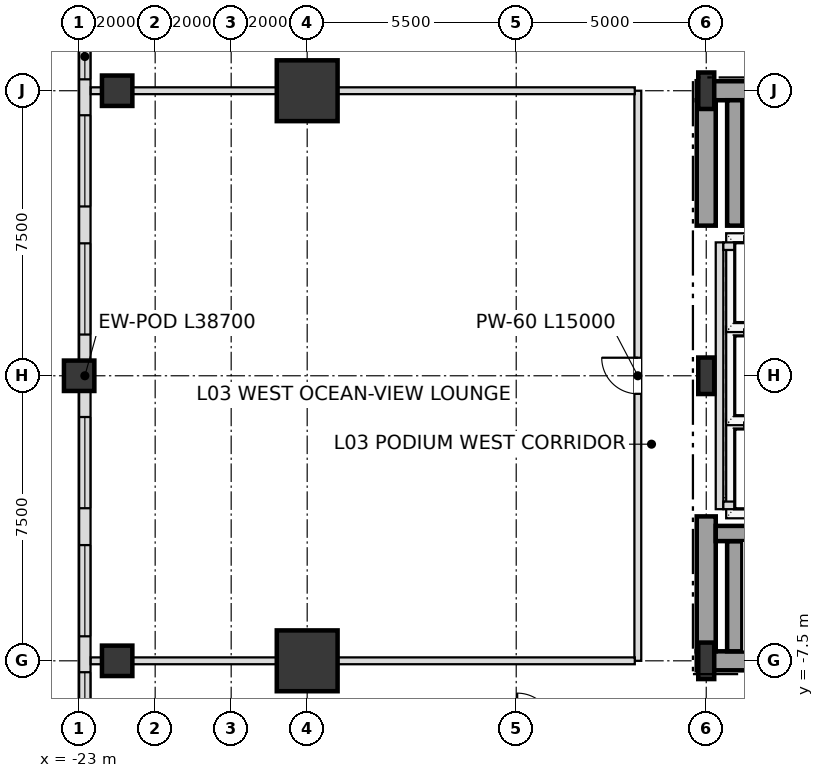
"""IFC4 building model, lengths in metres.
Left out: names, types, materials, properties, quantities, classifications, styles, units other than length and angle.
Written with IfcOpenShell. Run it as: python <this file> out.ifc"""

import sys

from ifc_helpers import new_model, si_unit, direction, frame, frame_2d, origin, origin_2d, place, context, subcontext, project, spatial, rectangle, i_section, extrude, element, fill, save


model = new_model("IFC4")
c1 = context("Model", 3, precision=1e-05, world=origin(), true_north=direction((0.0, 1.0)))
c2 = subcontext(c1, "Body", "Model", "MODEL_VIEW")
j1 = project(units=[si_unit("LENGTHUNIT", "METRE"), si_unit("PLANEANGLEUNIT", "RADIAN")], contexts=[c1])
p1 = place(None, origin())
s1 = spatial("IfcSite", under=j1, at=p1, CompositionType="ELEMENT")
p2 = place(p1, origin())
s2 = spatial("IfcBuilding", under=s1, at=p2, CompositionType="ELEMENT")
p3 = place(p2, frame((0.0, 0.0, 16.8)))
s3 = spatial("IfcBuildingStorey", under=s2, at=p3, CompositionType="ELEMENT", Elevation=16.8)
for number, where, z_axis, x_axis in (
    (1, (-6.5, -7.5, 0.0), (0.0, 0.0, 1.0), (1.0, 0.0, 0.0)),
    (2, (-6.5, 0.0, 0.0), (0.0, 0.0, 1.0), (1.0, 0.0, 0.0)),
    (3, (-6.5, 7.5, 0.0), (0.0, 0.0, 1.0), (1.0, 0.0, 0.0)),
):
    element("IfcColumn", number, at=place(p3, frame(where, z_axis=z_axis, x_axis=x_axis)), inside=s3, PredefinedType="COLUMN", context=c2, shape_type="SweptSolid", body=[
        extrude(i_section(OverallWidth=0.42, OverallDepth=0.96, WebThickness=0.022, FlangeThickness=0.034, at=origin_2d()), origin(), (0.0, 0.0, 1.0), 5.4),
    ])
for number, where, z_axis, x_axis in (
    (4, (-17.0, 7.5, 0.0), (0.0, 0.0, 1.0), (1.0, 0.0, 0.0)),
    (5, (-17.0, -7.5, 0.0), (0.0, 0.0, 1.0), (1.0, 0.0, 0.0)),
):
    element("IfcColumn", number, at=place(p3, frame(where, z_axis=z_axis, x_axis=x_axis)), inside=s3, PredefinedType="USERDEFINED", context=c2, shape_type="SweptSolid", body=[
        extrude(rectangle(XDim=1.6, YDim=1.6, at=origin_2d()), origin(), (0.0, 0.0, 1.0), 5.4),
    ])
for number, where, z_axis, x_axis in (
    (6, (-23.0, 0.0, 0.0), (0.0, 0.0, 1.0), (1.0, 0.0, 0.0)),
    (7, (-22.0, -7.5, 0.0), (0.0, 0.0, 1.0), (1.0, 0.0, 0.0)),
    (8, (-22.0, 7.5, 0.0), (0.0, 0.0, 1.0), (1.0, 0.0, 0.0)),
):
    element("IfcColumn", number, at=place(p3, frame(where, z_axis=z_axis, x_axis=x_axis)), inside=s3, PredefinedType="COLUMN", context=c2, shape_type="SweptSolid", body=[
        extrude(rectangle(XDim=0.8, YDim=0.8, at=origin_2d()), origin(), (0.0, 0.0, 1.0), 5.4),
    ])
p4 = place(p3, frame((-22.85, 19.35, 0.0), z_axis=(0.0, 0.0, 1.0), x_axis=(0.0, -1.0, 0.0)))
e9 = element("IfcWall", 9, at=p4, inside=s3, PredefinedType="SOLIDWALL", context=c2, shape_type="SweptSolid", body=[
    extrude(rectangle(XDim=38.7, YDim=0.3, at=frame_2d((19.35, 0.0))), origin(), (0.0, 0.0, 1.0), 4.476),
])
p5 = place(p4, frame((1.83, 0.0, 0.8)))
e10 = element("IfcOpeningElement", 10, at=p5, cuts=e9, PredefinedType="OPENING", context=c2, shape_type="SweptSolid", body=[
    extrude(rectangle(XDim=2.4, YDim=2.2, at=frame_2d((1.2, 1.1))), frame((0.0, 0.16, 0.0), z_axis=(0.0, -1.0, 0.0), x_axis=(1.0, 0.0, 0.0)), (0.0, 0.0, 1.0), 0.32),
])
p6 = place(p4, frame((7.22, 0.0, 0.8)))
e11 = element("IfcOpeningElement", 11, at=p6, cuts=e9, PredefinedType="OPENING", context=c2, shape_type="SweptSolid", body=[
    extrude(rectangle(XDim=2.4, YDim=2.2, at=frame_2d((1.2, 1.1))), frame((0.0, 0.16, 0.0), z_axis=(0.0, -1.0, 0.0), x_axis=(1.0, 0.0, 0.0)), (0.0, 0.0, 1.0), 0.32),
])
p7 = place(p4, frame((10.35, 0.0, 0.72)))
e12 = element("IfcOpeningElement", 12, at=p7, cuts=e9, PredefinedType="OPENING", context=c2, shape_type="SweptSolid", body=[
    extrude(rectangle(XDim=1.2, YDim=1.68, at=frame_2d((0.6, 0.84))), frame((0.0, 0.16, 0.0), z_axis=(0.0, -1.0, 0.0), x_axis=(1.0, 0.0, 0.0)), (0.0, 0.0, 1.0), 0.32),
])
p8 = place(p4, frame((12.495, 0.0, 0.8)))
e13 = element("IfcOpeningElement", 13, at=p8, cuts=e9, PredefinedType="OPENING", context=c2, shape_type="SweptSolid", body=[
    extrude(rectangle(XDim=2.4, YDim=2.2, at=frame_2d((1.2, 1.1))), frame((0.0, 0.16, 0.0), z_axis=(0.0, -1.0, 0.0), x_axis=(1.0, 0.0, 0.0)), (0.0, 0.0, 1.0), 0.32),
])
p9 = place(p4, frame((15.865, 0.0, 0.8)))
e14 = element("IfcOpeningElement", 14, at=p9, cuts=e9, PredefinedType="OPENING", context=c2, shape_type="SweptSolid", body=[
    extrude(rectangle(XDim=2.4, YDim=2.2, at=frame_2d((1.2, 1.1))), frame((0.0, 0.16, 0.0), z_axis=(0.0, -1.0, 0.0), x_axis=(1.0, 0.0, 0.0)), (0.0, 0.0, 1.0), 0.32),
])
p10 = place(p4, frame((20.435, 0.0, 0.8)))
e15 = element("IfcOpeningElement", 15, at=p10, cuts=e9, PredefinedType="OPENING", context=c2, shape_type="SweptSolid", body=[
    extrude(rectangle(XDim=2.4, YDim=2.2, at=frame_2d((1.2, 1.1))), frame((0.0, 0.16, 0.0), z_axis=(0.0, -1.0, 0.0), x_axis=(1.0, 0.0, 0.0)), (0.0, 0.0, 1.0), 0.32),
])
p11 = place(p4, frame((23.805, 0.0, 0.8)))
e16 = element("IfcOpeningElement", 16, at=p11, cuts=e9, PredefinedType="OPENING", context=c2, shape_type="SweptSolid", body=[
    extrude(rectangle(XDim=2.4, YDim=2.2, at=frame_2d((1.2, 1.1))), frame((0.0, 0.16, 0.0), z_axis=(0.0, -1.0, 0.0), x_axis=(1.0, 0.0, 0.0)), (0.0, 0.0, 1.0), 0.32),
])
p12 = place(p4, frame((27.15, 0.0, 0.72)))
e17 = element("IfcOpeningElement", 17, at=p12, cuts=e9, PredefinedType="OPENING", context=c2, shape_type="SweptSolid", body=[
    extrude(rectangle(XDim=1.2, YDim=1.68, at=frame_2d((0.6, 0.84))), frame((0.0, 0.16, 0.0), z_axis=(0.0, -1.0, 0.0), x_axis=(1.0, 0.0, 0.0)), (0.0, 0.0, 1.0), 0.32),
])
p13 = place(p4, frame((29.08, 0.0, 0.8)))
e18 = element("IfcOpeningElement", 18, at=p13, cuts=e9, PredefinedType="OPENING", context=c2, shape_type="SweptSolid", body=[
    extrude(rectangle(XDim=2.4, YDim=2.2, at=frame_2d((1.2, 1.1))), frame((0.0, 0.16, 0.0), z_axis=(0.0, -1.0, 0.0), x_axis=(1.0, 0.0, 0.0)), (0.0, 0.0, 1.0), 0.32),
])
p14 = place(p4, frame((34.47, 0.0, 0.8)))
e19 = element("IfcOpeningElement", 19, at=p14, cuts=e9, PredefinedType="OPENING", context=c2, shape_type="SweptSolid", body=[
    extrude(rectangle(XDim=2.4, YDim=2.2, at=frame_2d((1.2, 1.1))), frame((0.0, 0.16, 0.0), z_axis=(0.0, -1.0, 0.0), x_axis=(1.0, 0.0, 0.0)), (0.0, 0.0, 1.0), 0.32),
])
p15 = place(p3, frame((-6.75, -7.5, 0.0), z_axis=(0.0, 0.0, 1.0), x_axis=(1.0, 0.0, 0.0)))
e20 = element("IfcWall", 20, at=p15, inside=s3, PredefinedType="SHEAR", context=c2, shape_type="SweptSolid", body=[
    extrude(rectangle(XDim=6.75, YDim=0.5, at=frame_2d((3.375, 0.0))), origin(), (0.0, 0.0, 1.0), 5.12),
])
p16 = place(p3, frame((-6.75, 7.5, 0.0), z_axis=(0.0, 0.0, 1.0), x_axis=(1.0, 0.0, 0.0)))
e21 = element("IfcWall", 21, at=p16, inside=s3, PredefinedType="SHEAR", context=c2, shape_type="SweptSolid", body=[
    extrude(rectangle(XDim=6.75, YDim=0.5, at=frame_2d((3.375, 0.0))), origin(), (0.0, 0.0, 1.0), 5.12),
])
p17 = place(p16, frame((1.65, 0.0, 0.0)))
e22 = element("IfcOpeningElement", 22, at=p17, cuts=e21, PredefinedType="OPENING", context=c2, shape_type="SweptSolid", body=[
    extrude(rectangle(XDim=1.05, YDim=2.15, at=frame_2d((0.525, 1.075))), frame((0.0, 0.26, 0.0), z_axis=(0.0, -1.0, 0.0), x_axis=(1.0, 0.0, 0.0)), (0.0, 0.0, 1.0), 0.52),
])
p18 = place(p3, frame((-6.5, -7.25, 0.0), z_axis=(0.0, 0.0, 1.0), x_axis=(0.0, 1.0, 0.0)))
e23 = element("IfcWall", 23, at=p18, inside=s3, PredefinedType="SHEAR", context=c2, shape_type="SweptSolid", body=[
    extrude(rectangle(XDim=3.55, YDim=0.5, at=frame_2d((1.775, 0.0))), origin(), (0.0, 0.0, 1.0), 5.12),
])
p19 = place(p3, frame((-6.5, 3.95, 0.0), z_axis=(0.0, 0.0, 1.0), x_axis=(0.0, 1.0, 0.0)))
e24 = element("IfcWall", 24, at=p19, inside=s3, PredefinedType="SHEAR", context=c2, shape_type="SweptSolid", body=[
    extrude(rectangle(XDim=3.3, YDim=0.5, at=frame_2d((1.65, 0.0))), origin(), (0.0, 0.0, 1.0), 5.12),
])
p20 = place(p3, frame((-5.75, -7.25, 0.0), z_axis=(0.0, 0.0, 1.0), x_axis=(0.0, 1.0, 0.0)))
e25 = element("IfcWall", 25, at=p20, inside=s3, PredefinedType="SHEAR", context=c2, shape_type="SweptSolid", body=[
    extrude(rectangle(XDim=2.9, YDim=0.4, at=frame_2d((1.45, 0.0))), origin(), (0.0, 0.0, 1.0), 5.12),
])
p21 = place(p3, frame((-6.25, -4.15, 0.0), z_axis=(0.0, 0.0, 1.0), x_axis=(1.0, 0.0, 0.0)))
e26 = element("IfcWall", 26, at=p21, inside=s3, PredefinedType="SHEAR", context=c2, shape_type="SweptSolid", body=[
    extrude(rectangle(XDim=7.78, YDim=0.4, at=frame_2d((3.89, 0.0))), origin(), (0.0, 0.0, 1.0), 5.12),
])
p22 = place(p3, frame((-5.55, 4.15, 0.0), z_axis=(0.0, 0.0, 1.0), x_axis=(1.0, 0.0, 0.0)))
e27 = element("IfcWall", 27, at=p22, inside=s3, PredefinedType="SHEAR", context=c2, shape_type="SweptSolid", body=[
    extrude(rectangle(XDim=7.08, YDim=0.4, at=frame_2d((3.54, 0.0))), origin(), (0.0, 0.0, 1.0), 5.12),
])
p23 = place(p3, frame((-5.75, 3.95, 0.0), z_axis=(0.0, 0.0, 1.0), x_axis=(0.0, 1.0, 0.0)))
e28 = element("IfcWall", 28, at=p23, inside=s3, PredefinedType="SHEAR", context=c2, shape_type="SweptSolid", body=[
    extrude(rectangle(XDim=3.3, YDim=0.4, at=frame_2d((1.65, 0.0))), origin(), (0.0, 0.0, 1.0), 5.12),
])
p24 = place(p3, frame((-6.15, -3.51, 0.0), z_axis=(0.0, 0.0, 1.0), x_axis=(0.0, 1.0, 0.0)))
e29 = element("IfcWall", 29, at=p24, inside=s3, PredefinedType="SOLIDWALL", context=c2, shape_type="SweptSolid", body=[
    extrude(rectangle(XDim=7.02, YDim=0.2, at=frame_2d((3.51, 0.0))), origin(), (0.0, 0.0, 1.0), 5.12),
])
for number, where, z_axis, x_axis in (
    (30, (-6.05, -3.41, 0.0), (0.0, 0.0, 1.0), (1.0, 0.0, 0.0)),
    (31, (-6.05, 3.41, 0.0), (0.0, 0.0, 1.0), (1.0, 0.0, 0.0)),
):
    element("IfcWall", number, at=place(p3, frame(where, z_axis=z_axis, x_axis=x_axis)), inside=s3, PredefinedType="SOLIDWALL", context=c2, shape_type="SweptSolid", body=[
        extrude(rectangle(XDim=2.2, YDim=0.2, at=frame_2d((1.1, 0.0))), origin(), (0.0, 0.0, 1.0), 5.12),
    ])
p25 = place(p3, frame((-8.3, -7.5, 0.0), z_axis=(0.0, 0.0, 1.0), x_axis=(0.0, 1.0, 0.0)))
e32 = element("IfcWall", 32, at=p25, inside=s3, PredefinedType="PARTITIONING", context=c2, shape_type="SweptSolid", body=[
    extrude(rectangle(XDim=15.0, YDim=0.18, at=frame_2d((7.5, 0.0))), origin(), (0.0, 0.0, 1.0), 5.12),
])
p26 = place(p25, frame((7.025, 0.0, 0.0)))
e33 = element("IfcOpeningElement", 33, at=p26, cuts=e32, PredefinedType="OPENING", context=c2, shape_type="SweptSolid", body=[
    extrude(rectangle(XDim=0.95, YDim=2.15, at=frame_2d((0.475, 1.075))), frame((0.0, 0.1, 0.0), z_axis=(0.0, -1.0, 0.0), x_axis=(1.0, 0.0, 0.0)), (0.0, 0.0, 1.0), 0.2),
])
for number, where, z_axis, x_axis in (
    (34, (-22.695, -7.5, 0.0), (0.0, 0.0, 1.0), (1.0, 0.0, 0.0)),
    (35, (-22.695, 7.5, 0.0), (0.0, 0.0, 1.0), (1.0, 0.0, 0.0)),
):
    element("IfcWall", number, at=place(p3, frame(where, z_axis=z_axis, x_axis=x_axis)), inside=s3, PredefinedType="PARTITIONING", context=c2, shape_type="SweptSolid", body=[
        extrude(rectangle(XDim=14.315, YDim=0.18, at=frame_2d((7.158, 0.0))), origin(), (0.0, 0.0, 1.0), 4.41),
    ])
p27 = place(p7, origin())
e36 = element("IfcWindow", 36, at=p27, inside=s3, PartitioningType="SINGLE_PANEL", PredefinedType="WINDOW", context=c2, shape_type="SweptSolid", body=[
    extrude(rectangle(XDim=1.2, YDim=1.68, at=frame_2d((0.6, 0.84))), frame((0.0, 0.03, 0.0), z_axis=(0.0, -1.0, 0.0), x_axis=(1.0, 0.0, 0.0)), (0.0, 0.0, 1.0), 0.06),
])
fill(e12, e36)
p28 = place(p8, origin())
e37 = element("IfcWindow", 37, at=p28, inside=s3, PartitioningType="SINGLE_PANEL", PredefinedType="WINDOW", context=c2, shape_type="SweptSolid", body=[
    extrude(rectangle(XDim=2.4, YDim=2.2, at=frame_2d((1.2, 1.1))), frame((0.0, 0.03, 0.0), z_axis=(0.0, -1.0, 0.0), x_axis=(1.0, 0.0, 0.0)), (0.0, 0.0, 1.0), 0.06),
])
fill(e13, e37)
p29 = place(p9, origin())
e38 = element("IfcWindow", 38, at=p29, inside=s3, PartitioningType="SINGLE_PANEL", PredefinedType="WINDOW", context=c2, shape_type="SweptSolid", body=[
    extrude(rectangle(XDim=2.4, YDim=2.2, at=frame_2d((1.2, 1.1))), frame((0.0, 0.03, 0.0), z_axis=(0.0, -1.0, 0.0), x_axis=(1.0, 0.0, 0.0)), (0.0, 0.0, 1.0), 0.06),
])
fill(e14, e38)
p30 = place(p10, origin())
e39 = element("IfcWindow", 39, at=p30, inside=s3, PartitioningType="SINGLE_PANEL", PredefinedType="WINDOW", context=c2, shape_type="SweptSolid", body=[
    extrude(rectangle(XDim=2.4, YDim=2.2, at=frame_2d((1.2, 1.1))), frame((0.0, 0.03, 0.0), z_axis=(0.0, -1.0, 0.0), x_axis=(1.0, 0.0, 0.0)), (0.0, 0.0, 1.0), 0.06),
])
fill(e15, e39)
p31 = place(p11, origin())
e40 = element("IfcWindow", 40, at=p31, inside=s3, PartitioningType="SINGLE_PANEL", PredefinedType="WINDOW", context=c2, shape_type="SweptSolid", body=[
    extrude(rectangle(XDim=2.4, YDim=2.2, at=frame_2d((1.2, 1.1))), frame((0.0, 0.03, 0.0), z_axis=(0.0, -1.0, 0.0), x_axis=(1.0, 0.0, 0.0)), (0.0, 0.0, 1.0), 0.06),
])
fill(e16, e40)
p32 = place(p12, origin())
e41 = element("IfcWindow", 41, at=p32, inside=s3, PartitioningType="SINGLE_PANEL", PredefinedType="WINDOW", context=c2, shape_type="SweptSolid", body=[
    extrude(rectangle(XDim=1.2, YDim=1.68, at=frame_2d((0.6, 0.84))), frame((0.0, 0.03, 0.0), z_axis=(0.0, -1.0, 0.0), x_axis=(1.0, 0.0, 0.0)), (0.0, 0.0, 1.0), 0.06),
])
fill(e17, e41)
p33 = place(p26, origin())
e42 = element("IfcDoor", 42, at=p33, inside=s3, OperationType="SINGLE_SWING_RIGHT", PredefinedType="DOOR", context=c2, shape_type="SweptSolid", body=[
    extrude(rectangle(XDim=0.95, YDim=2.15, at=frame_2d((0.475, 1.075))), frame((0.0, 0.025, 0.0), z_axis=(0.0, -1.0, 0.0), x_axis=(1.0, 0.0, 0.0)), (0.0, 0.0, 1.0), 0.05),
])
fill(e33, e42)
save(model, sys.argv[1])
